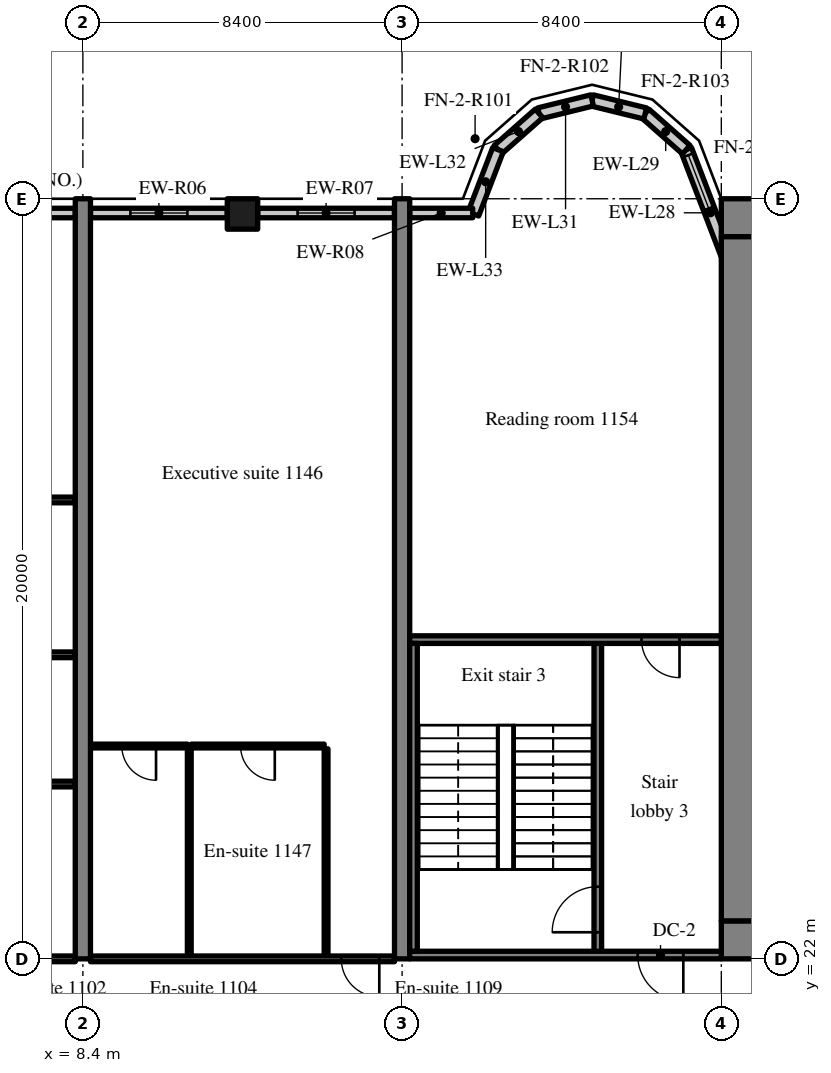
"""IFC4 building model, lengths in metres.
Left out: names, types, materials, properties, quantities, classifications, styles, units other than length and angle.
Written with IfcOpenShell. Run it as: python <this file> out.ifc"""

import sys

from ifc_helpers import new_model, si_unit, direction, frame, frame_2d, origin, origin_2d, place, context, subcontext, project, spatial, rectangle, extrude, source, transform, mapped, element, fill, save


model = new_model("IFC4")
c1 = context("Model", 3, precision=1e-05, world=origin(), true_north=direction((0.0, 1.0)))
c2 = subcontext(c1, "Body", "Model", "MODEL_VIEW")
j1 = project(units=[si_unit("LENGTHUNIT", "METRE"), si_unit("PLANEANGLEUNIT", "RADIAN")], contexts=[c1])
p1 = place(None, origin())
s1 = spatial("IfcSite", under=j1, at=p1, CompositionType="ELEMENT")
p2 = place(p1, origin())
s2 = spatial("IfcBuilding", under=s1, at=p2, CompositionType="ELEMENT")
p3 = place(p2, frame((0.0, 0.0, 50.6)))
s3 = spatial("IfcBuildingStorey", under=s2, at=p3, CompositionType="ELEMENT", Elevation=50.6)
m1 = source(origin(), c2, "Body", "SweptSolid", [
    extrude(rectangle(XDim=50.4, YDim=1.0, at=frame_2d((25.2, 0.0))), origin(), (0.0, 0.0, 1.0), 3.52),
])
p4 = place(p3, frame((25.2, 22.5, 0.0), z_axis=(0.0, 0.0, 1.0), x_axis=(1.0, 0.0, 0.0)))
e1 = element("IfcWall", 1, at=p4, inside=s3, PredefinedType="SHEAR", context=c2, shape_type="MappedRepresentation", body=[
    mapped(m1, transform((0.0, 0.0, 0.0), scale=1.0)),
])
m2 = source(origin(), c2, "Body", "SweptSolid", [
    extrude(rectangle(XDim=1.8, YDim=2.1, at=frame_2d((0.9, 1.05))), frame((0.0, 0.51, 0.0), z_axis=(0.0, -1.0, 0.0), x_axis=(1.0, 0.0, 0.0)), (0.0, 0.0, 1.0), 1.02),
])
p5 = place(p4, frame((15.9, 0.0, 0.0)))
e2 = element("IfcOpeningElement", 2, at=p5, cuts=e1, PredefinedType="OPENING", context=c2, shape_type="MappedRepresentation", body=[
    mapped(m2, transform((0.0, 0.0, 0.0), scale=1.0)),
])
m3 = source(origin(), c2, "Body", "SweptSolid", [
    extrude(rectangle(XDim=1.2, YDim=2.1, at=frame_2d((0.6, 1.05))), frame((0.0, 0.51, 0.0), z_axis=(0.0, -1.0, 0.0), x_axis=(1.0, 0.0, 0.0)), (0.0, 0.0, 1.0), 1.02),
])
p6 = place(p4, frame((26.987, 0.0, 0.0)))
e3 = element("IfcOpeningElement", 3, at=p6, cuts=e1, PredefinedType="OPENING", context=c2, shape_type="MappedRepresentation", body=[
    mapped(m3, transform((0.0, 0.0, 0.0), scale=1.0)),
])
m4 = source(origin(), c2, "Body", "SweptSolid", [
    extrude(rectangle(XDim=0.9, YDim=2.1, at=frame_2d((0.45, 1.05))), frame((0.0, 0.51, 0.0), z_axis=(0.0, -1.0, 0.0), x_axis=(1.0, 0.0, 0.0)), (0.0, 0.0, 1.0), 1.02),
])
p7 = place(p4, frame((33.75, 0.0, 0.0)))
e4 = element("IfcOpeningElement", 4, at=p7, cuts=e1, PredefinedType="OPENING", context=c2, shape_type="MappedRepresentation", body=[
    mapped(m4, transform((0.0, 0.0, 0.0), scale=1.0)),
])
p8 = place(p4, frame((30.75, 0.0, 0.0)))
e5 = element("IfcOpeningElement", 5, at=p8, cuts=e1, PredefinedType="OPENING", context=c2, shape_type="MappedRepresentation", body=[
    mapped(m4, transform((0.0, 0.0, 0.0), scale=1.0)),
])
p9 = place(p4, frame((38.262, 0.0, 0.0)))
e6 = element("IfcOpeningElement", 6, at=p9, cuts=e1, PredefinedType="OPENING", context=c2, shape_type="MappedRepresentation", body=[
    mapped(m4, transform((0.0, 0.0, 0.0), scale=1.0)),
])
p10 = place(p4, frame((6.438, 0.0, 0.0)))
e7 = element("IfcOpeningElement", 7, at=p10, cuts=e1, PredefinedType="OPENING", context=c2, shape_type="MappedRepresentation", body=[
    mapped(m3, transform((0.0, 0.0, 0.0), scale=1.0)),
])
p11 = place(p4, frame((47.725, 0.0, 0.0)))
e8 = element("IfcOpeningElement", 8, at=p11, cuts=e1, PredefinedType="OPENING", context=c2, shape_type="MappedRepresentation", body=[
    mapped(m3, transform((0.0, 0.0, 0.0), scale=1.0)),
])
p12 = place(p3, frame((25.2, 41.5, 0.0), z_axis=(0.0, 0.0, 1.0), x_axis=(1.0, 0.0, 0.0)))
e9 = element("IfcWall", 9, at=p12, inside=s3, PredefinedType="SHEAR", context=c2, shape_type="MappedRepresentation", body=[
    mapped(m1, transform((0.0, 0.0, 0.0), scale=1.0)),
])
m5 = source(origin(), c2, "Body", "SweptSolid", [
    extrude(rectangle(XDim=18.0, YDim=1.0, at=frame_2d((9.0, 0.0))), origin(), (0.0, 0.0, 1.0), 3.52),
])
p13 = place(p3, frame((25.7, 23.0, 0.0), z_axis=(0.0, 0.0, 1.0), x_axis=(0.0, 1.0, 0.0)))
e10 = element("IfcWall", 10, at=p13, inside=s3, PredefinedType="SHEAR", context=c2, shape_type="MappedRepresentation", body=[
    mapped(m5, transform((0.0, 0.0, 0.0), scale=1.0)),
])
m6 = source(origin(), c2, "Body", "SweptSolid", [
    extrude(rectangle(XDim=20.0, YDim=0.4, at=frame_2d((10.0, 0.0))), origin(), (0.0, 0.0, 1.0), 3.52),
])
for number, where, z_axis, x_axis in (
    (11, (8.4, 22.0, 0.0), (0.0, 0.0, 1.0), (0.0, 1.0, 0.0)),
    (12, (16.8, 22.0, 0.0), (0.0, 0.0, 1.0), (0.0, 1.0, 0.0)),
):
    element("IfcWall", number, at=place(p3, frame(where, z_axis=z_axis, x_axis=x_axis)), inside=s3, PredefinedType="SHEAR", context=c2, shape_type="MappedRepresentation", body=[
        mapped(m6, transform((0.0, 0.0, 0.0), scale=1.0)),
    ])
m7 = source(origin(), c2, "Body", "SweptSolid", [
    extrude(rectangle(XDim=0.8, YDim=0.8, at=origin_2d()), origin(), (0.0, 0.0, 1.0), 3.52),
])
p14 = place(p3, frame((12.6, 41.6, 0.0), z_axis=(0.0, 0.0, 1.0), x_axis=(1.0, 0.0, 0.0)))
e13 = element("IfcColumn", 13, at=p14, inside=s3, PredefinedType="COLUMN", context=c2, shape_type="MappedRepresentation", body=[
    mapped(m7, transform((0.0, 0.0, 0.0), scale=1.0)),
])
m8 = source(origin(), c2, "Body", "SweptSolid", [
    extrude(rectangle(XDim=3.559, YDim=0.3, at=frame_2d((1.78, 0.0))), origin(), (0.0, 0.0, 1.0), 3.52),
])
p15 = place(p3, frame((25.55, 39.969, 0.0), z_axis=(0.0, 0.0, 1.0), x_axis=(-0.35779745313, 0.933799219604, 0.0)))
e14 = element("IfcWall", 14, at=p15, inside=s3, PredefinedType="SOLIDWALL", context=c2, shape_type="MappedRepresentation", body=[
    mapped(m8, transform((0.0, 0.0, 0.0), scale=1.0)),
])
m9 = source(origin(), c2, "Body", "SweptSolid", [
    extrude(rectangle(XDim=1.5, YDim=2.0, at=frame_2d((0.75, 1.0))), frame((0.0, 0.16, 0.0), z_axis=(0.0, -1.0, 0.0), x_axis=(1.0, 0.0, 0.0)), (0.0, 0.0, 1.0), 0.32),
])
p16 = place(p15, frame((1.903, 0.0, 0.9)))
e15 = element("IfcOpeningElement", 15, at=p16, cuts=e14, PredefinedType="OPENING", context=c2, shape_type="MappedRepresentation", body=[
    mapped(m9, transform((0.0, 0.0, 0.0), scale=1.0)),
])
m10 = source(origin(), c2, "Body", "SweptSolid", [
    extrude(rectangle(XDim=1.44, YDim=0.3, at=frame_2d((0.72, 0.0))), origin(), (0.0, 0.0, 1.0), 3.52),
])
p17 = place(p3, frame((24.277, 43.292, 0.0), z_axis=(0.0, 0.0, 1.0), x_axis=(-0.749649827867, 0.661834673902, 0.0)))
e16 = element("IfcWall", 16, at=p17, inside=s3, PredefinedType="SOLIDWALL", context=c2, shape_type="MappedRepresentation", body=[
    mapped(m10, transform((0.0, 0.0, 0.0), scale=1.0)),
])
m11 = source(origin(), c2, "Body", "SweptSolid", [
    extrude(rectangle(XDim=1.438, YDim=0.3, at=frame_2d((0.719, 0.0))), origin(), (0.0, 0.0, 1.0), 3.52),
])
p18 = place(p3, frame((23.197, 44.245, 0.0), z_axis=(0.0, 0.0, 1.0), x_axis=(-0.971152283879, 0.238460146601, 0.0)))
e17 = element("IfcWall", 17, at=p18, inside=s3, PredefinedType="SOLIDWALL", context=c2, shape_type="MappedRepresentation", body=[
    mapped(m11, transform((0.0, 0.0, 0.0), scale=1.0)),
])
m12 = source(origin(), c2, "Body", "SweptSolid", [
    extrude(rectangle(XDim=1.439, YDim=0.3, at=frame_2d((0.719, 0.0))), origin(), (0.0, 0.0, 1.0), 3.52),
])
p19 = place(p3, frame((21.8, 44.588, 0.0), z_axis=(0.0, 0.0, 1.0), x_axis=(-0.971161932466, -0.238420848351, 0.0)))
e18 = element("IfcWall", 18, at=p19, inside=s3, PredefinedType="SOLIDWALL", context=c2, shape_type="MappedRepresentation", body=[
    mapped(m12, transform((0.0, 0.0, 0.0), scale=1.0)),
])
m13 = source(origin(), c2, "Body", "SweptSolid", [
    extrude(rectangle(XDim=1.44, YDim=0.3, at=frame_2d((0.72, 0.0))), origin(), (0.0, 0.0, 1.0), 3.52),
])
p20 = place(p3, frame((20.403, 44.245, 0.0), z_axis=(0.0, 0.0, 1.0), x_axis=(-0.74957555648, -0.661918790432, 0.0)))
e19 = element("IfcWall", 19, at=p20, inside=s3, PredefinedType="SOLIDWALL", context=c2, shape_type="MappedRepresentation", body=[
    mapped(m13, transform((0.0, 0.0, 0.0), scale=1.0)),
])
m14 = source(origin(), c2, "Body", "SweptSolid", [
    extrude(rectangle(XDim=1.812, YDim=0.3, at=frame_2d((0.906, 0.0))), origin(), (0.0, 0.0, 1.0), 3.52),
])
p21 = place(p3, frame((19.323, 43.292, 0.0), z_axis=(0.0, 0.0, 1.0), x_axis=(-0.357877270961, -0.93376863244, 0.0)))
e20 = element("IfcWall", 20, at=p21, inside=s3, PredefinedType="SOLIDWALL", context=c2, shape_type="MappedRepresentation", body=[
    mapped(m14, transform((0.0, 0.0, 0.0), scale=1.0)),
])
m15 = source(origin(), c2, "Body", "SweptSolid", [
    extrude(rectangle(XDim=4.045, YDim=0.25, at=frame_2d((2.022, 0.0))), origin(), (0.0, 0.0, 1.0), 2.82),
])
p22 = place(p3, frame((8.2, 41.625, 0.0), z_axis=(0.0, 0.0, 1.0), x_axis=(-1.0, 0.0, 0.0)))
e21 = element("IfcWall", 21, at=p22, inside=s3, PredefinedType="SOLIDWALL", context=c2, shape_type="MappedRepresentation", body=[
    mapped(m15, transform((0.0, 0.0, 0.0), scale=1.0)),
])
m16 = source(origin(), c2, "Body", "SweptSolid", [
    extrude(rectangle(XDim=1.5, YDim=1.5, at=frame_2d((0.75, 0.75))), frame((0.0, 0.135, 0.0), z_axis=(0.0, -1.0, 0.0), x_axis=(1.0, 0.0, 0.0)), (0.0, 0.0, 1.0), 0.27),
])
p23 = place(p22, frame((1.272, 0.0, 0.9)))
e22 = element("IfcOpeningElement", 22, at=p23, cuts=e21, PredefinedType="OPENING", context=c2, shape_type="MappedRepresentation", body=[
    mapped(m16, transform((0.0, 0.0, 0.0), scale=1.0)),
])
m17 = source(origin(), c2, "Body", "SweptSolid", [
    extrude(rectangle(XDim=3.6, YDim=0.25, at=frame_2d((1.8, 0.0))), origin(), (0.0, 0.0, 1.0), 2.82),
])
p24 = place(p3, frame((12.2, 41.625, 0.0), z_axis=(0.0, 0.0, 1.0), x_axis=(-1.0, 0.0, 0.0)))
e23 = element("IfcWall", 23, at=p24, inside=s3, PredefinedType="SOLIDWALL", context=c2, shape_type="MappedRepresentation", body=[
    mapped(m17, transform((0.0, 0.0, 0.0), scale=1.0)),
])
p25 = place(p24, frame((1.05, 0.0, 0.9)))
e24 = element("IfcOpeningElement", 24, at=p25, cuts=e23, PredefinedType="OPENING", context=c2, shape_type="MappedRepresentation", body=[
    mapped(m16, transform((0.0, 0.0, 0.0), scale=1.0)),
])
m18 = source(origin(), c2, "Body", "SweptSolid", [
    extrude(rectangle(XDim=3.6, YDim=0.25, at=frame_2d((1.8, 0.0))), origin(), (0.0, 0.0, 1.0), 2.82),
])
p26 = place(p3, frame((16.6, 41.625, 0.0), z_axis=(0.0, 0.0, 1.0), x_axis=(-1.0, 0.0, 0.0)))
e25 = element("IfcWall", 25, at=p26, inside=s3, PredefinedType="SOLIDWALL", context=c2, shape_type="MappedRepresentation", body=[
    mapped(m18, transform((0.0, 0.0, 0.0), scale=1.0)),
])
p27 = place(p26, frame((1.05, 0.0, 0.9)))
e26 = element("IfcOpeningElement", 26, at=p27, cuts=e25, PredefinedType="OPENING", context=c2, shape_type="MappedRepresentation", body=[
    mapped(m16, transform((0.0, 0.0, 0.0), scale=1.0)),
])
m19 = source(origin(), c2, "Body", "SweptSolid", [
    extrude(rectangle(XDim=1.658, YDim=0.25, at=frame_2d((0.829, 0.0))), origin(), (0.0, 0.0, 1.0), 2.82),
])
p28 = place(p3, frame((18.658, 41.625, 0.0), z_axis=(0.0, 0.0, 1.0), x_axis=(-1.0, 0.0, 0.0)))
e27 = element("IfcWall", 27, at=p28, inside=s3, PredefinedType="SOLIDWALL", context=c2, shape_type="MappedRepresentation", body=[
    mapped(m19, transform((0.0, 0.0, 0.0), scale=1.0)),
])
m20 = source(origin(), c2, "Body", "SweptSolid", [
    extrude(rectangle(XDim=8.3, YDim=0.2, at=frame_2d((4.15, 0.0))), origin(), (0.0, 0.0, 1.0), 3.52),
])
p29 = place(p3, frame((21.95, 22.1, 0.0), z_axis=(0.0, 0.0, 1.0), x_axis=(0.0, 1.0, 0.0)))
e28 = element("IfcWall", 28, at=p29, inside=s3, PredefinedType="SOLIDWALL", context=c2, shape_type="MappedRepresentation", body=[
    mapped(m20, transform((0.0, 0.0, 0.0), scale=1.0)),
])
m21 = source(origin(), c2, "Body", "SweptSolid", [
    extrude(rectangle(XDim=1.2, YDim=2.1, at=frame_2d((0.6, 1.05))), frame((0.0, 0.11, 0.0), z_axis=(0.0, -1.0, 0.0), x_axis=(1.0, 0.0, 0.0)), (0.0, 0.0, 1.0), 0.22),
])
p30 = place(p29, frame((0.6, 0.0, 0.0)))
e29 = element("IfcOpeningElement", 29, at=p30, cuts=e28, PredefinedType="OPENING", context=c2, shape_type="MappedRepresentation", body=[
    mapped(m21, transform((0.0, 0.0, 0.0), scale=1.0)),
])
m22 = source(origin(), c2, "Body", "SweptSolid", [
    extrude(rectangle(XDim=8.2, YDim=0.2, at=frame_2d((4.1, 0.0))), origin(), (0.0, 0.0, 1.0), 3.52),
])
p31 = place(p3, frame((17.0, 22.1, 0.0), z_axis=(0.0, 0.0, 1.0), x_axis=(1.0, 0.0, 0.0)))
e30 = element("IfcWall", 30, at=p31, inside=s3, PredefinedType="SOLIDWALL", context=c2, shape_type="MappedRepresentation", body=[
    mapped(m22, transform((0.0, 0.0, 0.0), scale=1.0)),
])
p32 = place(p31, frame((6.0, 0.0, 0.0)))
e31 = element("IfcOpeningElement", 31, at=p32, cuts=e30, PredefinedType="OPENING", context=c2, shape_type="MappedRepresentation", body=[
    mapped(m21, transform((0.0, 0.0, 0.0), scale=1.0)),
])
p33 = place(p3, frame((17.0, 30.4, 0.0), z_axis=(0.0, 0.0, 1.0), x_axis=(1.0, 0.0, 0.0)))
e32 = element("IfcWall", 32, at=p33, inside=s3, PredefinedType="SOLIDWALL", context=c2, shape_type="MappedRepresentation", body=[
    mapped(m22, transform((0.0, 0.0, 0.0), scale=1.0)),
])
m23 = source(origin(), c2, "Body", "SweptSolid", [
    extrude(rectangle(XDim=1.0, YDim=2.1, at=frame_2d((0.5, 1.05))), frame((0.0, 0.11, 0.0), z_axis=(0.0, -1.0, 0.0), x_axis=(1.0, 0.0, 0.0)), (0.0, 0.0, 1.0), 0.22),
])
p34 = place(p33, frame((6.1, 0.0, 0.0)))
e33 = element("IfcOpeningElement", 33, at=p34, cuts=e32, PredefinedType="OPENING", context=c2, shape_type="MappedRepresentation", body=[
    mapped(m23, transform((0.0, 0.0, 0.0), scale=1.0)),
])
m24 = source(origin(), c2, "Body", "SweptSolid", [
    extrude(rectangle(XDim=8.1, YDim=0.2, at=frame_2d((4.05, 0.0))), origin(), (0.0, 0.0, 1.0), 3.52),
])
p35 = place(p3, frame((17.1, 22.2, 0.0), z_axis=(0.0, 0.0, 1.0), x_axis=(0.0, 1.0, 0.0)))
e34 = element("IfcWall", 34, at=p35, inside=s3, PredefinedType="SOLIDWALL", context=c2, shape_type="MappedRepresentation", body=[
    mapped(m24, transform((0.0, 0.0, 0.0), scale=1.0)),
])
m25 = source(origin(), c2, "Body", "SweptSolid", [
    extrude(rectangle(XDim=5.25, YDim=0.15, at=frame_2d((2.625, 0.0))), origin(), (0.0, 0.0, 1.0), 2.82),
])
p36 = place(p3, frame((2.95, 22.0, 0.0), z_axis=(0.0, 0.0, 1.0), x_axis=(1.0, 0.0, 0.0)))
e35 = element("IfcWall", 35, at=p36, inside=s3, PredefinedType="PARTITIONING", context=c2, shape_type="MappedRepresentation", body=[
    mapped(m25, transform((0.0, 0.0, 0.0), scale=1.0)),
])
m26 = source(origin(), c2, "Body", "SweptSolid", [
    extrude(rectangle(XDim=5.25, YDim=0.15, at=frame_2d((2.625, 0.0))), origin(), (0.0, 0.0, 1.0), 3.52),
])
for number, where, z_axis, x_axis in (
    (36, (2.95, 26.6, 0.0), (0.0, 0.0, 1.0), (1.0, 0.0, 0.0)),
    (37, (2.95, 30.0, 0.0), (0.0, 0.0, 1.0), (1.0, 0.0, 0.0)),
):
    element("IfcWall", number, at=place(p3, frame(where, z_axis=z_axis, x_axis=x_axis)), inside=s3, PredefinedType="PARTITIONING", context=c2, shape_type="MappedRepresentation", body=[
        mapped(m26, transform((0.0, 0.0, 0.0), scale=1.0)),
    ])
m27 = source(origin(), c2, "Body", "SweptSolid", [
    extrude(rectangle(XDim=7.8, YDim=0.15, at=frame_2d((3.9, 0.0))), origin(), (0.0, 0.0, 1.0), 3.52),
])
p37 = place(p3, frame((0.4, 34.075, 0.0), z_axis=(0.0, 0.0, 1.0), x_axis=(1.0, 0.0, 0.0)))
e38 = element("IfcWall", 38, at=p37, inside=s3, PredefinedType="PARTITIONING", context=c2, shape_type="MappedRepresentation", body=[
    mapped(m27, transform((0.0, 0.0, 0.0), scale=1.0)),
])
m28 = source(origin(), c2, "Body", "SweptSolid", [
    extrude(rectangle(XDim=1.0, YDim=2.1, at=frame_2d((0.5, 1.05))), frame((0.0, 0.085, 0.0), z_axis=(0.0, -1.0, 0.0), x_axis=(1.0, 0.0, 0.0)), (0.0, 0.0, 1.0), 0.17),
])
p38 = place(p37, frame((0.7, 0.0, 0.0)))
e39 = element("IfcOpeningElement", 39, at=p38, cuts=e38, PredefinedType="OPENING", context=c2, shape_type="MappedRepresentation", body=[
    mapped(m28, transform((0.0, 0.0, 0.0), scale=1.0)),
])
m29 = source(origin(), c2, "Body", "SweptSolid", [
    extrude(rectangle(XDim=5.45, YDim=0.1, at=frame_2d((2.725, 0.0))), origin(), (0.0, 0.0, 1.0), 3.52),
])
for number, where, z_axis, x_axis in (
    (40, (14.8, 22.075, 0.0), (0.0, 0.0, 1.0), (0.0, 1.0, 0.0)),
    (41, (11.2, 22.075, 0.0), (0.0, 0.0, 1.0), (0.0, 1.0, 0.0)),
):
    element("IfcWall", number, at=place(p3, frame(where, z_axis=z_axis, x_axis=x_axis)), inside=s3, PredefinedType="PARTITIONING", context=c2, shape_type="MappedRepresentation", body=[
        mapped(m29, transform((0.0, 0.0, 0.0), scale=1.0)),
    ])
m30 = source(origin(), c2, "Body", "SweptSolid", [
    extrude(rectangle(XDim=3.5, YDim=0.1, at=frame_2d((1.75, 0.0))), origin(), (0.0, 0.0, 1.0), 3.52),
])
p39 = place(p3, frame((11.25, 27.6, 0.0), z_axis=(0.0, 0.0, 1.0), x_axis=(1.0, 0.0, 0.0)))
e42 = element("IfcWall", 42, at=p39, inside=s3, PredefinedType="PARTITIONING", context=c2, shape_type="MappedRepresentation", body=[
    mapped(m30, transform((0.0, 0.0, 0.0), scale=1.0)),
])
m31 = source(origin(), c2, "Body", "SweptSolid", [
    extrude(rectangle(XDim=0.9, YDim=2.1, at=frame_2d((0.45, 1.05))), frame((0.0, 0.06, 0.0), z_axis=(0.0, -1.0, 0.0), x_axis=(1.0, 0.0, 0.0)), (0.0, 0.0, 1.0), 0.12),
])
p40 = place(p39, frame((1.3, 0.0, 0.0)))
e43 = element("IfcOpeningElement", 43, at=p40, cuts=e42, PredefinedType="OPENING", context=c2, shape_type="MappedRepresentation", body=[
    mapped(m31, transform((0.0, 0.0, 0.0), scale=1.0)),
])
m32 = source(origin(), c2, "Body", "SweptSolid", [
    extrude(rectangle(XDim=2.55, YDim=0.1, at=frame_2d((1.275, 0.0))), origin(), (0.0, 0.0, 1.0), 3.52),
])
p41 = place(p3, frame((8.6, 27.6, 0.0), z_axis=(0.0, 0.0, 1.0), x_axis=(1.0, 0.0, 0.0)))
e44 = element("IfcWall", 44, at=p41, inside=s3, PredefinedType="PARTITIONING", context=c2, shape_type="MappedRepresentation", body=[
    mapped(m32, transform((0.0, 0.0, 0.0), scale=1.0)),
])
p42 = place(p41, frame((0.825, 0.0, 0.0)))
e45 = element("IfcOpeningElement", 45, at=p42, cuts=e44, PredefinedType="OPENING", context=c2, shape_type="MappedRepresentation", body=[
    mapped(m31, transform((0.0, 0.0, 0.0), scale=1.0)),
])
m33 = source(origin(), c2, "Body", "SweptSolid", [
    extrude(rectangle(XDim=8.0, YDim=0.15, at=frame_2d((4.0, 0.0))), origin(), (0.0, 0.0, 1.0), 2.82),
])
p43 = place(p3, frame((8.6, 22.0, 0.0), z_axis=(0.0, 0.0, 1.0), x_axis=(1.0, 0.0, 0.0)))
e46 = element("IfcWall", 46, at=p43, inside=s3, PredefinedType="PARTITIONING", context=c2, shape_type="MappedRepresentation", body=[
    mapped(m33, transform((0.0, 0.0, 0.0), scale=1.0)),
])
p44 = place(p43, frame((6.6, 0.0, 0.0)))
e47 = element("IfcOpeningElement", 47, at=p44, cuts=e46, PredefinedType="OPENING", context=c2, shape_type="MappedRepresentation", body=[
    mapped(m28, transform((0.0, 0.0, 0.0), scale=1.0)),
])
m34 = source(origin(), c2, "Body", "SweptSolid", [
    extrude(rectangle(XDim=1.5, YDim=2.0, at=frame_2d((0.75, 1.0))), frame((0.0, 0.03, 0.0), z_axis=(0.0, -1.0, 0.0), x_axis=(1.0, 0.0, 0.0)), (0.0, 0.0, 1.0), 0.06),
])
p45 = place(p16, origin())
e48 = element("IfcWindow", 48, at=p45, inside=s3, PartitioningType="SINGLE_PANEL", PredefinedType="WINDOW", context=c2, shape_type="MappedRepresentation", body=[
    mapped(m34, transform((0.0, 0.0, 0.0), scale=1.0)),
])
fill(e15, e48)
m35 = source(origin(), c2, "Body", "SweptSolid", [
    extrude(rectangle(XDim=1.5, YDim=1.5, at=frame_2d((0.75, 0.75))), frame((0.0, 0.03, 0.0), z_axis=(0.0, -1.0, 0.0), x_axis=(1.0, 0.0, 0.0)), (0.0, 0.0, 1.0), 0.06),
])
p46 = place(p25, origin())
e49 = element("IfcWindow", 49, at=p46, inside=s3, PartitioningType="SINGLE_PANEL", PredefinedType="WINDOW", context=c2, shape_type="MappedRepresentation", body=[
    mapped(m35, transform((0.0, 0.0, 0.0), scale=1.0)),
])
fill(e24, e49)
p47 = place(p27, origin())
e50 = element("IfcWindow", 50, at=p47, inside=s3, PartitioningType="SINGLE_PANEL", PredefinedType="WINDOW", context=c2, shape_type="MappedRepresentation", body=[
    mapped(m35, transform((0.0, 0.0, 0.0), scale=1.0)),
])
fill(e26, e50)
m36 = source(origin(), c2, "Body", "SweptSolid", [
    extrude(rectangle(XDim=1.2, YDim=2.1, at=frame_2d((0.6, 1.05))), frame((0.0, 0.025, 0.0), z_axis=(0.0, -1.0, 0.0), x_axis=(1.0, 0.0, 0.0)), (0.0, 0.0, 1.0), 0.05),
])
p48 = place(p30, origin())
e51 = element("IfcDoor", 51, at=p48, inside=s3, OperationType="SINGLE_SWING_LEFT", PredefinedType="DOOR", context=c2, shape_type="MappedRepresentation", body=[
    mapped(m36, transform((0.0, 0.0, 0.0), scale=1.0)),
])
fill(e29, e51)
p49 = place(p32, origin())
e52 = element("IfcDoor", 52, at=p49, inside=s3, OperationType="SINGLE_SWING_RIGHT", PredefinedType="DOOR", context=c2, shape_type="MappedRepresentation", body=[
    mapped(m36, transform((0.0, 0.0, 0.0), scale=1.0)),
])
fill(e31, e52)
m37 = source(origin(), c2, "Body", "SweptSolid", [
    extrude(rectangle(XDim=1.0, YDim=2.1, at=frame_2d((0.5, 1.05))), frame((0.0, 0.025, 0.0), z_axis=(0.0, -1.0, 0.0), x_axis=(1.0, 0.0, 0.0)), (0.0, 0.0, 1.0), 0.05),
])
p50 = place(p34, origin())
e53 = element("IfcDoor", 53, at=p50, inside=s3, OperationType="SINGLE_SWING_RIGHT", PredefinedType="DOOR", context=c2, shape_type="MappedRepresentation", body=[
    mapped(m37, transform((0.0, 0.0, 0.0), scale=1.0)),
])
fill(e33, e53)
m38 = source(origin(), c2, "Body", "SweptSolid", [
    extrude(rectangle(XDim=0.9, YDim=2.1, at=frame_2d((0.45, 1.05))), frame((0.0, 0.025, 0.0), z_axis=(0.0, -1.0, 0.0), x_axis=(1.0, 0.0, 0.0)), (0.0, 0.0, 1.0), 0.05),
])
p51 = place(p40, origin())
e54 = element("IfcDoor", 54, at=p51, inside=s3, OperationType="SINGLE_SWING_RIGHT", PredefinedType="DOOR", context=c2, shape_type="MappedRepresentation", body=[
    mapped(m38, transform((0.0, 0.0, 0.0), scale=1.0)),
])
fill(e43, e54)
p52 = place(p42, origin())
e55 = element("IfcDoor", 55, at=p52, inside=s3, OperationType="SINGLE_SWING_RIGHT", PredefinedType="DOOR", context=c2, shape_type="MappedRepresentation", body=[
    mapped(m38, transform((0.0, 0.0, 0.0), scale=1.0)),
])
fill(e45, e55)
p53 = place(p44, origin())
e56 = element("IfcDoor", 56, at=p53, inside=s3, OperationType="SINGLE_SWING_RIGHT", PredefinedType="DOOR", context=c2, shape_type="MappedRepresentation", body=[
    mapped(m37, transform((0.0, 0.0, 0.0), scale=1.0)),
])
fill(e47, e56)
save(model, sys.argv[1])
